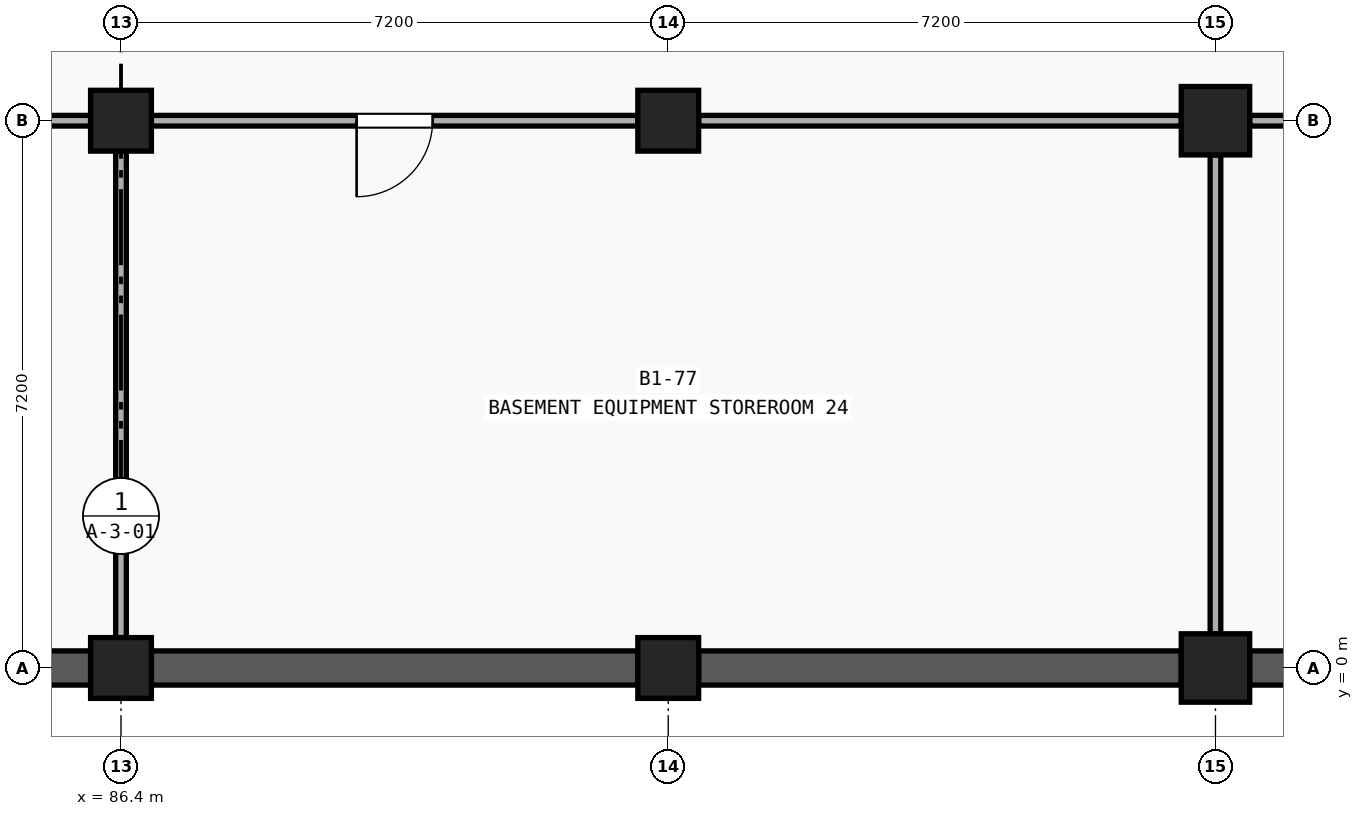
"""IFC4 building model, lengths in metres.
Left out: names, types, materials, properties, quantities, classifications, styles, units other than length and angle.
Written with IfcOpenShell. Run it as: python <this file> out.ifc"""

import sys

from ifc_helpers import new_model, si_unit, direction, frame, frame_2d, origin, origin_2d, place, context, subcontext, project, spatial, rectangle, extrude, element, fill, save


model = new_model("IFC4")
c1 = context("Model", 3, precision=1e-05, world=origin(), true_north=direction((0.0, 1.0)))
c2 = subcontext(c1, "Body", "Model", "MODEL_VIEW")
j1 = project(units=[si_unit("LENGTHUNIT", "METRE"), si_unit("PLANEANGLEUNIT", "RADIAN")], contexts=[c1])
p1 = place(None, origin())
s1 = spatial("IfcSite", under=j1, at=p1, CompositionType="ELEMENT")
p2 = place(p1, origin())
s2 = spatial("IfcBuilding", under=s1, at=p2, CompositionType="ELEMENT")
p3 = place(p2, frame((0.0, 0.0, -4.5)))
s3 = spatial("IfcBuildingStorey", under=s2, at=p3, CompositionType="ELEMENT", Elevation=-4.5)
for number, where, z_axis, x_axis in (
    (1, (86.4, 0.0, 0.0), (0.0, 0.0, 1.0), (1.0, 0.0, 0.0)),
    (2, (86.4, 7.2, 0.0), (0.0, 0.0, 1.0), (1.0, 0.0, 0.0)),
    (3, (93.6, 0.0, 0.0), (0.0, 0.0, 1.0), (1.0, 0.0, 0.0)),
    (4, (93.6, 7.2, 0.0), (0.0, 0.0, 1.0), (1.0, 0.0, 0.0)),
):
    element("IfcColumn", number, at=place(p3, frame(where, z_axis=z_axis, x_axis=x_axis)), inside=s3, PredefinedType="COLUMN", context=c2, shape_type="SweptSolid", body=[
        extrude(rectangle(XDim=0.8, YDim=0.8, at=origin_2d()), origin(), (0.0, 0.0, 1.0), 4.5),
    ])
for number, where, z_axis, x_axis in (
    (5, (100.8, 0.0, 0.0), (0.0, 0.0, 1.0), (1.0, 0.0, 0.0)),
    (6, (100.8, 7.2, 0.0), (0.0, 0.0, 1.0), (1.0, 0.0, 0.0)),
):
    element("IfcColumn", number, at=place(p3, frame(where, z_axis=z_axis, x_axis=x_axis)), inside=s3, PredefinedType="COLUMN", context=c2, shape_type="SweptSolid", body=[
        extrude(rectangle(XDim=0.9, YDim=0.9, at=origin_2d()), origin(), (0.0, 0.0, 1.0), 4.5),
    ])
for number, where, z_axis, x_axis in (
    (7, (79.6, 0.0, 0.0), (0.0, 0.0, 1.0), (1.0, 0.0, 0.0)),
    (8, (86.8, 0.0, 0.0), (0.0, 0.0, 1.0), (1.0, 0.0, 0.0)),
):
    element("IfcWall", number, at=place(p3, frame(where, z_axis=z_axis, x_axis=x_axis)), inside=s3, PredefinedType="SOLIDWALL", context=c2, shape_type="SweptSolid", body=[
        extrude(rectangle(XDim=6.4, YDim=0.45, at=frame_2d((3.2, 0.0))), origin(), (0.0, 0.0, 1.0), 3.57),
    ])
p4 = place(p3, frame((94.0, 0.0, 0.0), z_axis=(0.0, 0.0, 1.0), x_axis=(1.0, 0.0, 0.0)))
e9 = element("IfcWall", 9, at=p4, inside=s3, PredefinedType="SOLIDWALL", context=c2, shape_type="SweptSolid", body=[
    extrude(rectangle(XDim=6.35, YDim=0.45, at=frame_2d((3.175, 0.0))), origin(), (0.0, 0.0, 1.0), 3.57),
])
p5 = place(p3, frame((101.25, 0.0, 0.0), z_axis=(0.0, 0.0, 1.0), x_axis=(1.0, 0.0, 0.0)))
e10 = element("IfcWall", 10, at=p5, inside=s3, PredefinedType="SOLIDWALL", context=c2, shape_type="SweptSolid", body=[
    extrude(rectangle(XDim=6.3, YDim=0.45, at=frame_2d((3.15, 0.0))), origin(), (0.0, 0.0, 1.0), 3.57),
])
p6 = place(p3, frame((79.6, 7.2, 0.0), z_axis=(0.0, 0.0, 1.0), x_axis=(1.0, 0.0, 0.0)))
e11 = element("IfcWall", 11, at=p6, inside=s3, PredefinedType="PARTITIONING", context=c2, shape_type="SweptSolid", body=[
    extrude(rectangle(XDim=6.4, YDim=0.14, at=frame_2d((3.2, 0.0))), origin(), (0.0, 0.0, 1.0), 3.3),
])
p7 = place(p3, frame((86.4, 0.4, 0.0), z_axis=(0.0, 0.0, 1.0), x_axis=(0.0, 1.0, 0.0)))
e12 = element("IfcWall", 12, at=p7, inside=s3, PredefinedType="PARTITIONING", context=c2, shape_type="SweptSolid", body=[
    extrude(rectangle(XDim=6.4, YDim=0.14, at=frame_2d((3.2, 0.0))), origin(), (0.0, 0.0, 1.0), 3.3),
])
p8 = place(p3, frame((86.8, 7.2, 0.0), z_axis=(0.0, 0.0, 1.0), x_axis=(1.0, 0.0, 0.0)))
e13 = element("IfcWall", 13, at=p8, inside=s3, PredefinedType="PARTITIONING", context=c2, shape_type="SweptSolid", body=[
    extrude(rectangle(XDim=6.4, YDim=0.14, at=frame_2d((3.2, 0.0))), origin(), (0.0, 0.0, 1.0), 3.3),
])
p9 = place(p8, frame((2.7, 0.0, 0.0)))
e14 = element("IfcOpeningElement", 14, at=p9, cuts=e13, PredefinedType="OPENING", context=c2, shape_type="SweptSolid", body=[
    extrude(rectangle(XDim=1.0, YDim=2.1, at=frame_2d((0.5, 1.05))), frame((0.0, 0.082, 0.0), z_axis=(0.0, -1.0, 0.0), x_axis=(1.0, 0.0, 0.0)), (0.0, 0.0, 1.0), 0.164),
])
p10 = place(p3, frame((94.0, 7.2, 0.0), z_axis=(0.0, 0.0, 1.0), x_axis=(1.0, 0.0, 0.0)))
e15 = element("IfcWall", 15, at=p10, inside=s3, PredefinedType="PARTITIONING", context=c2, shape_type="SweptSolid", body=[
    extrude(rectangle(XDim=6.35, YDim=0.14, at=frame_2d((3.175, 0.0))), origin(), (0.0, 0.0, 1.0), 3.3),
])
p11 = place(p3, frame((100.8, 0.45, 0.0), z_axis=(0.0, 0.0, 1.0), x_axis=(0.0, 1.0, 0.0)))
e16 = element("IfcWall", 16, at=p11, inside=s3, PredefinedType="PARTITIONING", context=c2, shape_type="SweptSolid", body=[
    extrude(rectangle(XDim=6.3, YDim=0.14, at=frame_2d((3.15, 0.0))), origin(), (0.0, 0.0, 1.0), 3.3),
])
p12 = place(p3, frame((101.25, 7.2, 0.0), z_axis=(0.0, 0.0, 1.0), x_axis=(1.0, 0.0, 0.0)))
e17 = element("IfcWall", 17, at=p12, inside=s3, PredefinedType="PARTITIONING", context=c2, shape_type="SweptSolid", body=[
    extrude(rectangle(XDim=6.3, YDim=0.14, at=frame_2d((3.15, 0.0))), origin(), (0.0, 0.0, 1.0), 3.3),
])
p13 = place(p12, frame((2.57, 0.0, 0.0)))
e18 = element("IfcOpeningElement", 18, at=p13, cuts=e17, PredefinedType="OPENING", context=c2, shape_type="SweptSolid", body=[
    extrude(rectangle(XDim=1.16, YDim=2.22, at=frame_2d((0.58, 1.11))), frame((0.0, 0.082, 0.0), z_axis=(0.0, -1.0, 0.0), x_axis=(1.0, 0.0, 0.0)), (0.0, 0.0, 1.0), 0.164),
])
p14 = place(p9, frame((1.0, 0.0, 0.0), z_axis=(0.0, 0.0, 1.0), x_axis=(-1.0, 0.0, 0.0)))
e19 = element("IfcDoor", 19, at=p14, inside=s3, OperationType="SINGLE_SWING_RIGHT", PredefinedType="DOOR", context=c2, shape_type="SweptSolid", body=[
    extrude(rectangle(XDim=1.0, YDim=2.1, at=frame_2d((0.5, 1.05))), frame((0.0, 0.025, 0.0), z_axis=(0.0, -1.0, 0.0), x_axis=(1.0, 0.0, 0.0)), (0.0, 0.0, 1.0), 0.05),
])
fill(e14, e19)
save(model, sys.argv[1])
